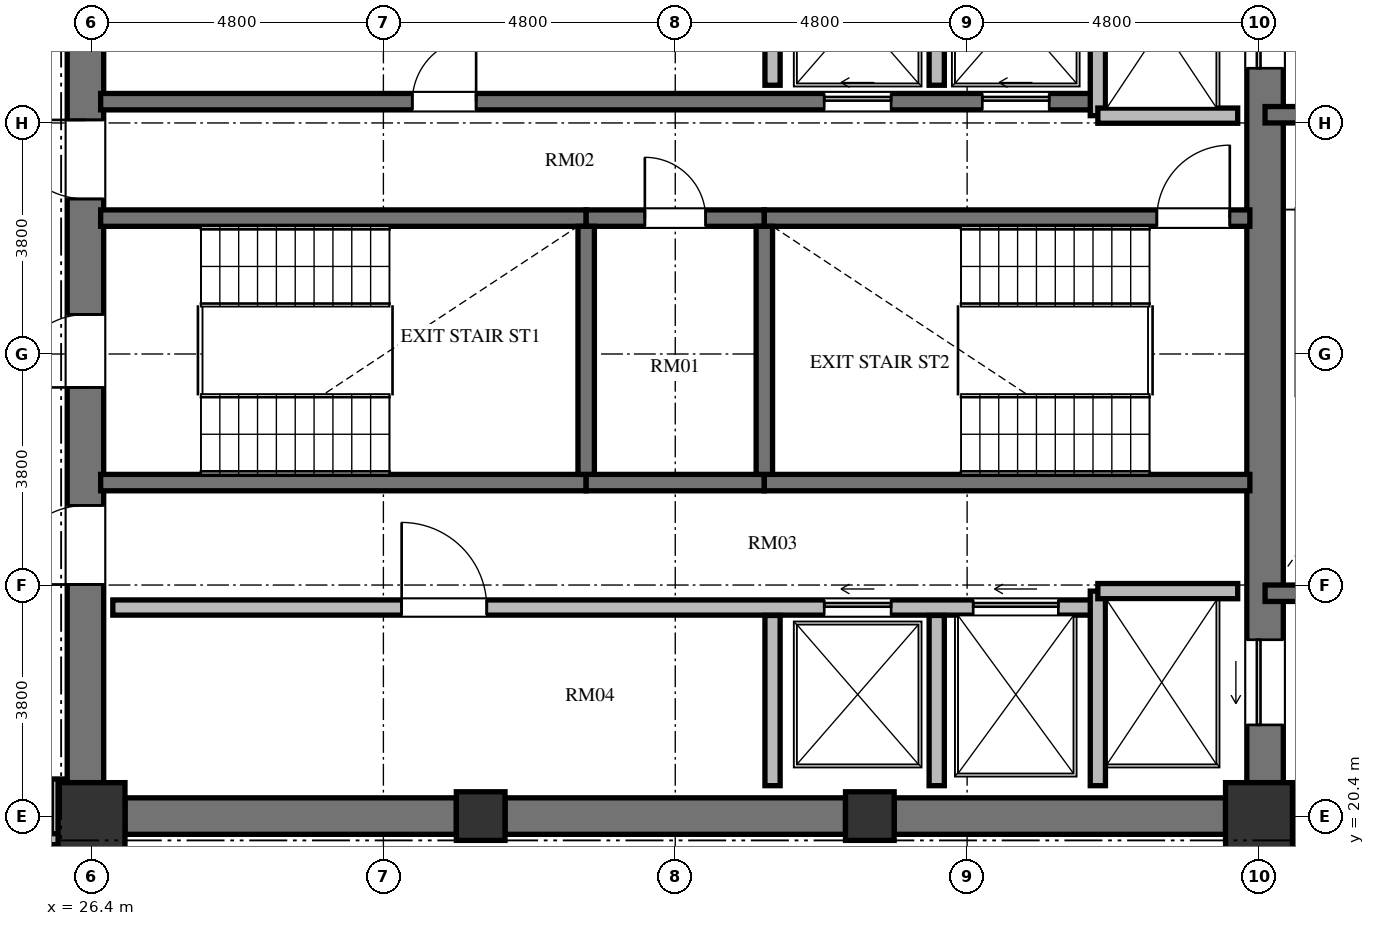
"""IFC4 building model, lengths in metres.
Left out: names, types, materials, properties, quantities, classifications, styles, units other than length and angle.
Written with IfcOpenShell. Run it as: python <this file> out.ifc"""

import sys

from ifc_helpers import new_model, si_unit, direction, frame, frame_2d, origin, origin_2d, place, context, subcontext, project, spatial, rectangle, extrude, element, fill, save


model = new_model("IFC4")
c1 = context("Model", 3, precision=1e-05, world=origin(), true_north=direction((0.0, 1.0)))
c2 = subcontext(c1, "Body", "Model", "MODEL_VIEW")
j1 = project(units=[si_unit("LENGTHUNIT", "METRE"), si_unit("PLANEANGLEUNIT", "RADIAN")], contexts=[c1])
p1 = place(None, origin())
s1 = spatial("IfcSite", under=j1, at=p1, CompositionType="ELEMENT")
p2 = place(p1, origin())
s2 = spatial("IfcBuilding", under=s1, at=p2, CompositionType="ELEMENT")
p3 = place(p2, frame((0.0, 0.0, 220.368)))
s3 = spatial("IfcBuildingStorey", under=s2, at=p3, CompositionType="ELEMENT", Elevation=220.368)
p4 = place(p3, frame((26.4, 20.4, 0.0), z_axis=(0.0, 0.0, 1.0), x_axis=(1.0, 0.0, 0.0)))
e1 = element("IfcColumn", 1, at=p4, inside=s3, PredefinedType="COLUMN", context=c2, shape_type="SweptSolid", body=[
    extrude(rectangle(XDim=1.1, YDim=1.1, at=origin_2d()), origin(), (0.0, 0.0, 1.0), 3.648),
])
for number, where, z_axis, x_axis in (
    (2, (32.8, 20.4, 0.0), (0.0, 0.0, 1.0), (1.0, 0.0, 0.0)),
    (3, (39.2, 20.4, 0.0), (0.0, 0.0, 1.0), (1.0, 0.0, 0.0)),
):
    element("IfcColumn", number, at=place(p3, frame(where, z_axis=z_axis, x_axis=x_axis)), inside=s3, PredefinedType="COLUMN", context=c2, shape_type="SweptSolid", body=[
        extrude(rectangle(XDim=0.8, YDim=0.8, at=origin_2d()), origin(), (0.0, 0.0, 1.0), 3.648),
    ])
p5 = place(p3, frame((45.6, 20.4, 0.0), z_axis=(0.0, 0.0, 1.0), x_axis=(1.0, 0.0, 0.0)))
e4 = element("IfcColumn", 4, at=p5, inside=s3, PredefinedType="COLUMN", context=c2, shape_type="SweptSolid", body=[
    extrude(rectangle(XDim=1.1, YDim=1.1, at=origin_2d()), origin(), (0.0, 0.0, 1.0), 3.648),
])
p6 = place(p3, frame((26.3, 20.95, 0.0), z_axis=(0.0, 0.0, 1.0), x_axis=(0.0, 1.0, 0.0)))
e5 = element("IfcWall", 5, at=p6, inside=s3, PredefinedType="SHEAR", context=c2, shape_type="SweptSolid", body=[
    extrude(rectangle(XDim=14.1, YDim=0.6, at=frame_2d((7.05, 0.0))), origin(), (0.0, 0.0, 1.0), 3.648),
])
p7 = place(p6, frame((6.5, 0.0, 0.0)))
e6 = element("IfcOpeningElement", 6, at=p7, cuts=e5, PredefinedType="OPENING", context=c2, shape_type="SweptSolid", body=[
    extrude(rectangle(XDim=1.2, YDim=2.15, at=frame_2d((0.6, 1.075))), frame((0.0, 0.31, 0.0), z_axis=(0.0, -1.0, 0.0), x_axis=(1.0, 0.0, 0.0)), (0.0, 0.0, 1.0), 0.62),
])
p8 = place(p6, frame((9.6, 0.0, 0.0)))
e7 = element("IfcOpeningElement", 7, at=p8, cuts=e5, PredefinedType="OPENING", context=c2, shape_type="SweptSolid", body=[
    extrude(rectangle(XDim=1.3, YDim=2.2, at=frame_2d((0.65, 1.1))), frame((0.0, 0.31, 0.0), z_axis=(0.0, -1.0, 0.0), x_axis=(1.0, 0.0, 0.0)), (0.0, 0.0, 1.0), 0.62),
])
p9 = place(p6, frame((3.26, 0.0, 0.0)))
e8 = element("IfcOpeningElement", 8, at=p9, cuts=e5, PredefinedType="OPENING", context=c2, shape_type="SweptSolid", body=[
    extrude(rectangle(XDim=1.3, YDim=2.2, at=frame_2d((0.65, 1.1))), frame((0.0, 0.31, 0.0), z_axis=(0.0, -1.0, 0.0), x_axis=(1.0, 0.0, 0.0)), (0.0, 0.0, 1.0), 0.62),
])
p10 = place(p3, frame((45.7, 20.95, 0.0), z_axis=(0.0, 0.0, 1.0), x_axis=(0.0, 1.0, 0.0)))
e9 = element("IfcWall", 9, at=p10, inside=s3, PredefinedType="SHEAR", context=c2, shape_type="SweptSolid", body=[
    extrude(rectangle(XDim=14.1, YDim=0.6, at=frame_2d((7.05, 0.0))), origin(), (0.0, 0.0, 1.0), 3.648),
])
p11 = place(p10, frame((11.75, 0.0, 0.0)))
e10 = element("IfcOpeningElement", 10, at=p11, cuts=e9, PredefinedType="OPENING", context=c2, shape_type="SweptSolid", body=[
    extrude(rectangle(XDim=1.4, YDim=2.3, at=frame_2d((0.7, 1.15))), frame((0.0, 0.31, 0.0), z_axis=(0.0, -1.0, 0.0), x_axis=(1.0, 0.0, 0.0)), (0.0, 0.0, 1.0), 0.62),
])
p12 = place(p10, frame((0.95, 0.0, 0.0)))
e11 = element("IfcOpeningElement", 11, at=p12, cuts=e9, PredefinedType="OPENING", context=c2, shape_type="SweptSolid", body=[
    extrude(rectangle(XDim=1.4, YDim=2.3, at=frame_2d((0.7, 1.15))), frame((0.0, 0.31, 0.0), z_axis=(0.0, -1.0, 0.0), x_axis=(1.0, 0.0, 0.0)), (0.0, 0.0, 1.0), 0.62),
])
p13 = place(p3, frame((26.95, 20.4, 0.0), z_axis=(0.0, 0.0, 1.0), x_axis=(1.0, 0.0, 0.0)))
e12 = element("IfcWall", 12, at=p13, inside=s3, PredefinedType="SHEAR", context=c2, shape_type="SweptSolid", body=[
    extrude(rectangle(XDim=5.45, YDim=0.6, at=frame_2d((2.725, 0.0))), origin(), (0.0, 0.0, 1.0), 3.648),
])
p14 = place(p3, frame((33.2, 20.4, 0.0), z_axis=(0.0, 0.0, 1.0), x_axis=(1.0, 0.0, 0.0)))
e13 = element("IfcWall", 13, at=p14, inside=s3, PredefinedType="SHEAR", context=c2, shape_type="SweptSolid", body=[
    extrude(rectangle(XDim=5.6, YDim=0.6, at=frame_2d((2.8, 0.0))), origin(), (0.0, 0.0, 1.0), 3.648),
])
p15 = place(p3, frame((39.6, 20.4, 0.0), z_axis=(0.0, 0.0, 1.0), x_axis=(1.0, 0.0, 0.0)))
e14 = element("IfcWall", 14, at=p15, inside=s3, PredefinedType="SHEAR", context=c2, shape_type="SweptSolid", body=[
    extrude(rectangle(XDim=5.45, YDim=0.6, at=frame_2d((2.725, 0.0))), origin(), (0.0, 0.0, 1.0), 3.648),
])
p16 = place(p3, frame((26.55, 30.235, 0.0), z_axis=(0.0, 0.0, 1.0), x_axis=(1.0, 0.0, 0.0)))
e15 = element("IfcWall", 15, at=p16, inside=s3, PredefinedType="SHEAR", context=c2, shape_type="SweptSolid", body=[
    extrude(rectangle(XDim=7.985, YDim=0.27, at=frame_2d((3.992, 0.0))), origin(), (0.0, 0.0, 1.0), 3.648),
])
p17 = place(p3, frame((34.535, 30.235, 0.0), z_axis=(0.0, 0.0, 1.0), x_axis=(1.0, 0.0, 0.0)))
e16 = element("IfcWall", 16, at=p17, inside=s3, PredefinedType="SHEAR", context=c2, shape_type="SweptSolid", body=[
    extrude(rectangle(XDim=2.93, YDim=0.27, at=frame_2d((1.465, 0.0))), origin(), (0.0, 0.0, 1.0), 3.648),
])
p18 = place(p17, frame((0.965, 0.0, 0.0)))
e17 = element("IfcOpeningElement", 17, at=p18, cuts=e16, PredefinedType="OPENING", context=c2, shape_type="SweptSolid", body=[
    extrude(rectangle(XDim=1.0, YDim=2.1, at=frame_2d((0.5, 1.05))), frame((0.0, 0.145, 0.0), z_axis=(0.0, -1.0, 0.0), x_axis=(1.0, 0.0, 0.0)), (0.0, 0.0, 1.0), 0.29),
])
p19 = place(p3, frame((37.465, 30.235, 0.0), z_axis=(0.0, 0.0, 1.0), x_axis=(1.0, 0.0, 0.0)))
e18 = element("IfcWall", 18, at=p19, inside=s3, PredefinedType="SHEAR", context=c2, shape_type="SweptSolid", body=[
    extrude(rectangle(XDim=7.985, YDim=0.27, at=frame_2d((3.992, 0.0))), origin(), (0.0, 0.0, 1.0), 3.648),
])
p20 = place(p19, frame((6.455, 0.0, 0.0)))
e19 = element("IfcOpeningElement", 19, at=p20, cuts=e18, PredefinedType="OPENING", context=c2, shape_type="SweptSolid", body=[
    extrude(rectangle(XDim=1.2, YDim=2.15, at=frame_2d((0.6, 1.075))), frame((0.0, 0.145, 0.0), z_axis=(0.0, -1.0, 0.0), x_axis=(1.0, 0.0, 0.0)), (0.0, 0.0, 1.0), 0.29),
])
p21 = place(p3, frame((26.55, 25.885, 0.0), z_axis=(0.0, 0.0, 1.0), x_axis=(1.0, 0.0, 0.0)))
e20 = element("IfcWall", 20, at=p21, inside=s3, PredefinedType="SHEAR", context=c2, shape_type="SweptSolid", body=[
    extrude(rectangle(XDim=7.985, YDim=0.27, at=frame_2d((3.992, 0.0))), origin(), (0.0, 0.0, 1.0), 3.648),
])
p22 = place(p3, frame((34.535, 25.885, 0.0), z_axis=(0.0, 0.0, 1.0), x_axis=(1.0, 0.0, 0.0)))
e21 = element("IfcWall", 21, at=p22, inside=s3, PredefinedType="SHEAR", context=c2, shape_type="SweptSolid", body=[
    extrude(rectangle(XDim=2.93, YDim=0.27, at=frame_2d((1.465, 0.0))), origin(), (0.0, 0.0, 1.0), 3.648),
])
p23 = place(p3, frame((37.465, 25.885, 0.0), z_axis=(0.0, 0.0, 1.0), x_axis=(1.0, 0.0, 0.0)))
e22 = element("IfcWall", 22, at=p23, inside=s3, PredefinedType="SHEAR", context=c2, shape_type="SweptSolid", body=[
    extrude(rectangle(XDim=7.985, YDim=0.27, at=frame_2d((3.992, 0.0))), origin(), (0.0, 0.0, 1.0), 3.648),
])
for number, where, z_axis, x_axis in (
    (23, (34.535, 26.02, 0.0), (0.0, 0.0, 1.0), (0.0, 1.0, 0.0)),
    (24, (37.465, 26.02, 0.0), (0.0, 0.0, 1.0), (0.0, 1.0, 0.0)),
):
    element("IfcWall", number, at=place(p3, frame(where, z_axis=z_axis, x_axis=x_axis)), inside=s3, PredefinedType="SHEAR", context=c2, shape_type="SweptSolid", body=[
        extrude(rectangle(XDim=4.08, YDim=0.27, at=frame_2d((2.04, 0.0))), origin(), (0.0, 0.0, 1.0), 3.648),
    ])
p24 = place(p3, frame((26.55, 32.15, 0.0), z_axis=(0.0, 0.0, 1.0), x_axis=(1.0, 0.0, 0.0)))
e25 = element("IfcWall", 25, at=p24, inside=s3, PredefinedType="SHEAR", context=c2, shape_type="SweptSolid", body=[
    extrude(rectangle(XDim=16.4, YDim=0.27, at=frame_2d((8.2, 0.0))), origin(), (0.0, 0.0, 1.0), 3.648),
])
p25 = place(p24, frame((5.125, 0.0, 0.0)))
e26 = element("IfcOpeningElement", 26, at=p25, cuts=e25, PredefinedType="OPENING", context=c2, shape_type="SweptSolid", body=[
    extrude(rectangle(XDim=1.05, YDim=2.15, at=frame_2d((0.525, 1.075))), frame((0.0, 0.145, 0.0), z_axis=(0.0, -1.0, 0.0), x_axis=(1.0, 0.0, 0.0)), (0.0, 0.0, 1.0), 0.29),
])
p26 = place(p24, frame((11.9, 0.0, 0.0)))
e27 = element("IfcOpeningElement", 27, at=p26, cuts=e25, PredefinedType="OPENING", context=c2, shape_type="SweptSolid", body=[
    extrude(rectangle(XDim=1.1, YDim=2.2, at=frame_2d((0.55, 1.1))), frame((0.0, 0.145, 0.0), z_axis=(0.0, -1.0, 0.0), x_axis=(1.0, 0.0, 0.0)), (0.0, 0.0, 1.0), 0.29),
])
p27 = place(p24, frame((14.5, 0.0, 0.0)))
e28 = element("IfcOpeningElement", 28, at=p27, cuts=e25, PredefinedType="OPENING", context=c2, shape_type="SweptSolid", body=[
    extrude(rectangle(XDim=1.1, YDim=2.2, at=frame_2d((0.55, 1.1))), frame((0.0, 0.145, 0.0), z_axis=(0.0, -1.0, 0.0), x_axis=(1.0, 0.0, 0.0)), (0.0, 0.0, 1.0), 0.29),
])
p28 = place(p3, frame((26.75, 23.83, 0.0), z_axis=(0.0, 0.0, 1.0), x_axis=(1.0, 0.0, 0.0)))
e29 = element("IfcWall", 29, at=p28, inside=s3, PredefinedType="SOLIDWALL", context=c2, shape_type="SweptSolid", body=[
    extrude(rectangle(XDim=16.2, YDim=0.25, at=frame_2d((8.1, 0.0))), origin(), (0.0, 0.0, 1.0), 3.448),
])
p29 = place(p28, frame((4.75, 0.0, 0.0)))
e30 = element("IfcOpeningElement", 30, at=p29, cuts=e29, PredefinedType="OPENING", context=c2, shape_type="SweptSolid", body=[
    extrude(rectangle(XDim=1.4, YDim=2.2, at=frame_2d((0.7, 1.1))), frame((0.0, 0.135, 0.0), z_axis=(0.0, -1.0, 0.0), x_axis=(1.0, 0.0, 0.0)), (0.0, 0.0, 1.0), 0.27),
])
p30 = place(p28, frame((11.7, 0.0, 0.0)))
e31 = element("IfcOpeningElement", 31, at=p30, cuts=e29, PredefinedType="OPENING", context=c2, shape_type="SweptSolid", body=[
    extrude(rectangle(XDim=1.1, YDim=2.2, at=frame_2d((0.55, 1.1))), frame((0.0, 0.135, 0.0), z_axis=(0.0, -1.0, 0.0), x_axis=(1.0, 0.0, 0.0)), (0.0, 0.0, 1.0), 0.27),
])
p31 = place(p28, frame((14.15, 0.0, 0.0)))
e32 = element("IfcOpeningElement", 32, at=p31, cuts=e29, PredefinedType="OPENING", context=c2, shape_type="SweptSolid", body=[
    extrude(rectangle(XDim=1.4, YDim=2.3, at=frame_2d((0.7, 1.15))), frame((0.0, 0.135, 0.0), z_axis=(0.0, -1.0, 0.0), x_axis=(1.0, 0.0, 0.0)), (0.0, 0.0, 1.0), 0.27),
])
p32 = place(p3, frame((42.95, 31.92, 0.0), z_axis=(0.0, 0.0, 1.0), x_axis=(0.0, 1.0, 0.0)))
e33 = element("IfcWall", 33, at=p32, inside=s3, PredefinedType="SOLIDWALL", context=c2, shape_type="SweptSolid", body=[
    extrude(rectangle(XDim=3.18, YDim=0.25, at=frame_2d((1.59, 0.0))), origin(), (0.0, 0.0, 1.0), 3.448),
])
p33 = place(p3, frame((42.95, 31.92, 0.0), z_axis=(0.0, 0.0, 1.0), x_axis=(1.0, 0.0, 0.0)))
e34 = element("IfcWall", 34, at=p33, inside=s3, PredefinedType="SOLIDWALL", context=c2, shape_type="SweptSolid", body=[
    extrude(rectangle(XDim=2.3, YDim=0.25, at=frame_2d((1.15, 0.0))), origin(), (0.0, 0.0, 1.0), 3.448),
])
p34 = place(p3, frame((42.95, 20.9, 0.0), z_axis=(0.0, 0.0, 1.0), x_axis=(0.0, 1.0, 0.0)))
e35 = element("IfcWall", 35, at=p34, inside=s3, PredefinedType="SOLIDWALL", context=c2, shape_type="SweptSolid", body=[
    extrude(rectangle(XDim=3.2, YDim=0.25, at=frame_2d((1.6, 0.0))), origin(), (0.0, 0.0, 1.0), 3.448),
])
p35 = place(p3, frame((42.95, 24.1, 0.0), z_axis=(0.0, 0.0, 1.0), x_axis=(1.0, 0.0, 0.0)))
e36 = element("IfcWall", 36, at=p35, inside=s3, PredefinedType="SOLIDWALL", context=c2, shape_type="SweptSolid", body=[
    extrude(rectangle(XDim=2.3, YDim=0.25, at=frame_2d((1.15, 0.0))), origin(), (0.0, 0.0, 1.0), 3.448),
])
p36 = place(p3, frame((37.6, 32.42, 0.0), z_axis=(0.0, 0.0, 1.0), x_axis=(0.0, 1.0, 0.0)))
e37 = element("IfcWall", 37, at=p36, inside=s3, PredefinedType="SOLIDWALL", context=c2, shape_type="SweptSolid", body=[
    extrude(rectangle(XDim=2.68, YDim=0.25, at=frame_2d((1.34, 0.0))), origin(), (0.0, 0.0, 1.0), 3.448),
])
p37 = place(p3, frame((37.6, 20.9, 0.0), z_axis=(0.0, 0.0, 1.0), x_axis=(0.0, 1.0, 0.0)))
e38 = element("IfcWall", 38, at=p37, inside=s3, PredefinedType="SOLIDWALL", context=c2, shape_type="SweptSolid", body=[
    extrude(rectangle(XDim=2.8, YDim=0.25, at=frame_2d((1.4, 0.0))), origin(), (0.0, 0.0, 1.0), 3.448),
])
p38 = place(p3, frame((40.3, 32.42, 0.0), z_axis=(0.0, 0.0, 1.0), x_axis=(0.0, 1.0, 0.0)))
e39 = element("IfcWall", 39, at=p38, inside=s3, PredefinedType="SOLIDWALL", context=c2, shape_type="SweptSolid", body=[
    extrude(rectangle(XDim=2.68, YDim=0.25, at=frame_2d((1.34, 0.0))), origin(), (0.0, 0.0, 1.0), 3.448),
])
p39 = place(p3, frame((40.3, 20.9, 0.0), z_axis=(0.0, 0.0, 1.0), x_axis=(0.0, 1.0, 0.0)))
e40 = element("IfcWall", 40, at=p39, inside=s3, PredefinedType="SOLIDWALL", context=c2, shape_type="SweptSolid", body=[
    extrude(rectangle(XDim=2.8, YDim=0.25, at=frame_2d((1.4, 0.0))), origin(), (0.0, 0.0, 1.0), 3.448),
])
for number, where, z_axis, x_axis in (
    (41, (45.7, 31.935, 0.0), (0.0, 0.0, 1.0), (1.0, 0.0, 0.0)),
    (42, (45.7, 24.065, 0.0), (0.0, 0.0, 1.0), (1.0, 0.0, 0.0)),
):
    element("IfcWall", number, at=place(p3, frame(where, z_axis=z_axis, x_axis=x_axis)), inside=s3, PredefinedType="SHEAR", context=c2, shape_type="SweptSolid", body=[
        extrude(rectangle(XDim=4.715, YDim=0.27, at=frame_2d((2.357, 0.0))), origin(), (0.0, 0.0, 1.0), 3.648),
    ])
p40 = place(p3, frame((45.7, 20.02, 0.0), z_axis=(0.0, 0.0, 1.0), x_axis=(1.0, 0.0, 0.0)))
e43 = element("IfcWall", 43, at=p40, inside=s3, PredefinedType="SOLIDWALL", context=c2, shape_type="SweptSolid", body=[
    extrude(rectangle(XDim=4.715, YDim=0.25, at=frame_2d((2.357, 0.0))), origin(), (0.0, 0.0, 1.0), 3.448),
])
p41 = place(p3, frame((25.83, 21.01, 0.0), z_axis=(0.0, 0.0, 1.0), x_axis=(0.0, -1.0, 0.0)))
e44 = element("IfcWall", 44, at=p41, inside=s3, PredefinedType="PARTITIONING", context=c2, shape_type="SweptSolid", body=[
    extrude(rectangle(XDim=1.03, YDim=0.18, at=frame_2d((0.515, 0.0))), origin(), (0.0, 0.0, 1.0), 3.448),
])
p42 = place(p3, frame((25.87, 20.02, 0.0), z_axis=(0.0, 0.0, 1.0), x_axis=(-1.0, 0.0, 0.0)))
e45 = element("IfcWall", 45, at=p42, inside=s3, PredefinedType="PARTITIONING", context=c2, shape_type="SweptSolid", body=[
    extrude(rectangle(XDim=2.56, YDim=0.18, at=frame_2d((1.28, 0.0))), origin(), (0.0, 0.0, 1.0), 3.448),
])
p43 = place(p7, origin())
e46 = element("IfcDoor", 46, at=p43, inside=s3, OperationType="SINGLE_SWING_LEFT", PredefinedType="DOOR", context=c2, shape_type="SweptSolid", body=[
    extrude(rectangle(XDim=1.2, YDim=2.15, at=frame_2d((0.6, 1.075))), frame((0.0, 0.025, 0.0), z_axis=(0.0, -1.0, 0.0), x_axis=(1.0, 0.0, 0.0)), (0.0, 0.0, 1.0), 0.05),
])
fill(e6, e46)
p44 = place(p20, origin())
e47 = element("IfcDoor", 47, at=p44, inside=s3, OperationType="SINGLE_SWING_RIGHT", PredefinedType="DOOR", context=c2, shape_type="SweptSolid", body=[
    extrude(rectangle(XDim=1.2, YDim=2.15, at=frame_2d((0.6, 1.075))), frame((0.0, 0.025, 0.0), z_axis=(0.0, -1.0, 0.0), x_axis=(1.0, 0.0, 0.0)), (0.0, 0.0, 1.0), 0.05),
])
fill(e19, e47)
p45 = place(p18, origin())
e48 = element("IfcDoor", 48, at=p45, inside=s3, OperationType="SINGLE_SWING_LEFT", PredefinedType="DOOR", context=c2, shape_type="SweptSolid", body=[
    extrude(rectangle(XDim=1.0, YDim=2.1, at=frame_2d((0.5, 1.05))), frame((0.0, 0.025, 0.0), z_axis=(0.0, -1.0, 0.0), x_axis=(1.0, 0.0, 0.0)), (0.0, 0.0, 1.0), 0.05),
])
fill(e17, e48)
p46 = place(p8, origin())
e49 = element("IfcDoor", 49, at=p46, inside=s3, OperationType="SINGLE_SWING_RIGHT", PredefinedType="DOOR", context=c2, shape_type="SweptSolid", body=[
    extrude(rectangle(XDim=1.3, YDim=2.2, at=frame_2d((0.65, 1.1))), frame((0.0, 0.025, 0.0), z_axis=(0.0, -1.0, 0.0), x_axis=(1.0, 0.0, 0.0)), (0.0, 0.0, 1.0), 0.05),
])
fill(e7, e49)
p47 = place(p9, origin())
e50 = element("IfcDoor", 50, at=p47, inside=s3, OperationType="SINGLE_SWING_LEFT", PredefinedType="DOOR", context=c2, shape_type="SweptSolid", body=[
    extrude(rectangle(XDim=1.3, YDim=2.2, at=frame_2d((0.65, 1.1))), frame((0.0, 0.025, 0.0), z_axis=(0.0, -1.0, 0.0), x_axis=(1.0, 0.0, 0.0)), (0.0, 0.0, 1.0), 0.05),
])
fill(e8, e50)
p48 = place(p25, origin())
e51 = element("IfcDoor", 51, at=p48, inside=s3, OperationType="SINGLE_SWING_RIGHT", PredefinedType="DOOR", context=c2, shape_type="SweptSolid", body=[
    extrude(rectangle(XDim=1.05, YDim=2.15, at=frame_2d((0.525, 1.075))), frame((0.0, 0.025, 0.0), z_axis=(0.0, -1.0, 0.0), x_axis=(1.0, 0.0, 0.0)), (0.0, 0.0, 1.0), 0.05),
])
fill(e26, e51)
p49 = place(p29, origin())
e52 = element("IfcDoor", 52, at=p49, inside=s3, OperationType="SINGLE_SWING_LEFT", PredefinedType="DOOR", context=c2, shape_type="SweptSolid", body=[
    extrude(rectangle(XDim=1.4, YDim=2.2, at=frame_2d((0.7, 1.1))), frame((0.0, 0.025, 0.0), z_axis=(0.0, -1.0, 0.0), x_axis=(1.0, 0.0, 0.0)), (0.0, 0.0, 1.0), 0.05),
])
fill(e30, e52)
p50 = place(p26, origin())
e53 = element("IfcDoor", 53, at=p50, inside=s3, OperationType="SLIDING_TO_LEFT", PredefinedType="DOOR", context=c2, shape_type="SweptSolid", body=[
    extrude(rectangle(XDim=1.1, YDim=2.2, at=frame_2d((0.55, 1.1))), frame((0.0, 0.025, 0.0), z_axis=(0.0, -1.0, 0.0), x_axis=(1.0, 0.0, 0.0)), (0.0, 0.0, 1.0), 0.05),
])
fill(e27, e53)
p51 = place(p27, origin())
e54 = element("IfcDoor", 54, at=p51, inside=s3, OperationType="SLIDING_TO_LEFT", PredefinedType="DOOR", context=c2, shape_type="SweptSolid", body=[
    extrude(rectangle(XDim=1.1, YDim=2.2, at=frame_2d((0.55, 1.1))), frame((0.0, 0.025, 0.0), z_axis=(0.0, -1.0, 0.0), x_axis=(1.0, 0.0, 0.0)), (0.0, 0.0, 1.0), 0.05),
])
fill(e28, e54)
p52 = place(p30, origin())
e55 = element("IfcDoor", 55, at=p52, inside=s3, OperationType="SLIDING_TO_LEFT", PredefinedType="DOOR", context=c2, shape_type="SweptSolid", body=[
    extrude(rectangle(XDim=1.1, YDim=2.2, at=frame_2d((0.55, 1.1))), frame((0.0, 0.025, 0.0), z_axis=(0.0, -1.0, 0.0), x_axis=(1.0, 0.0, 0.0)), (0.0, 0.0, 1.0), 0.05),
])
fill(e31, e55)
p53 = place(p11, origin())
e56 = element("IfcDoor", 56, at=p53, inside=s3, OperationType="SLIDING_TO_LEFT", PredefinedType="DOOR", context=c2, shape_type="SweptSolid", body=[
    extrude(rectangle(XDim=1.4, YDim=2.3, at=frame_2d((0.7, 1.15))), frame((0.0, 0.025, 0.0), z_axis=(0.0, -1.0, 0.0), x_axis=(1.0, 0.0, 0.0)), (0.0, 0.0, 1.0), 0.05),
])
fill(e10, e56)
p54 = place(p12, origin())
e57 = element("IfcDoor", 57, at=p54, inside=s3, OperationType="SLIDING_TO_LEFT", PredefinedType="DOOR", context=c2, shape_type="SweptSolid", body=[
    extrude(rectangle(XDim=1.4, YDim=2.3, at=frame_2d((0.7, 1.15))), frame((0.0, 0.025, 0.0), z_axis=(0.0, -1.0, 0.0), x_axis=(1.0, 0.0, 0.0)), (0.0, 0.0, 1.0), 0.05),
])
fill(e11, e57)
p55 = place(p31, origin())
e58 = element("IfcDoor", 58, at=p55, inside=s3, OperationType="SLIDING_TO_LEFT", PredefinedType="DOOR", context=c2, shape_type="SweptSolid", body=[
    extrude(rectangle(XDim=1.4, YDim=2.3, at=frame_2d((0.7, 1.15))), frame((0.0, 0.025, 0.0), z_axis=(0.0, -1.0, 0.0), x_axis=(1.0, 0.0, 0.0)), (0.0, 0.0, 1.0), 0.05),
])
fill(e32, e58)
save(model, sys.argv[1])
